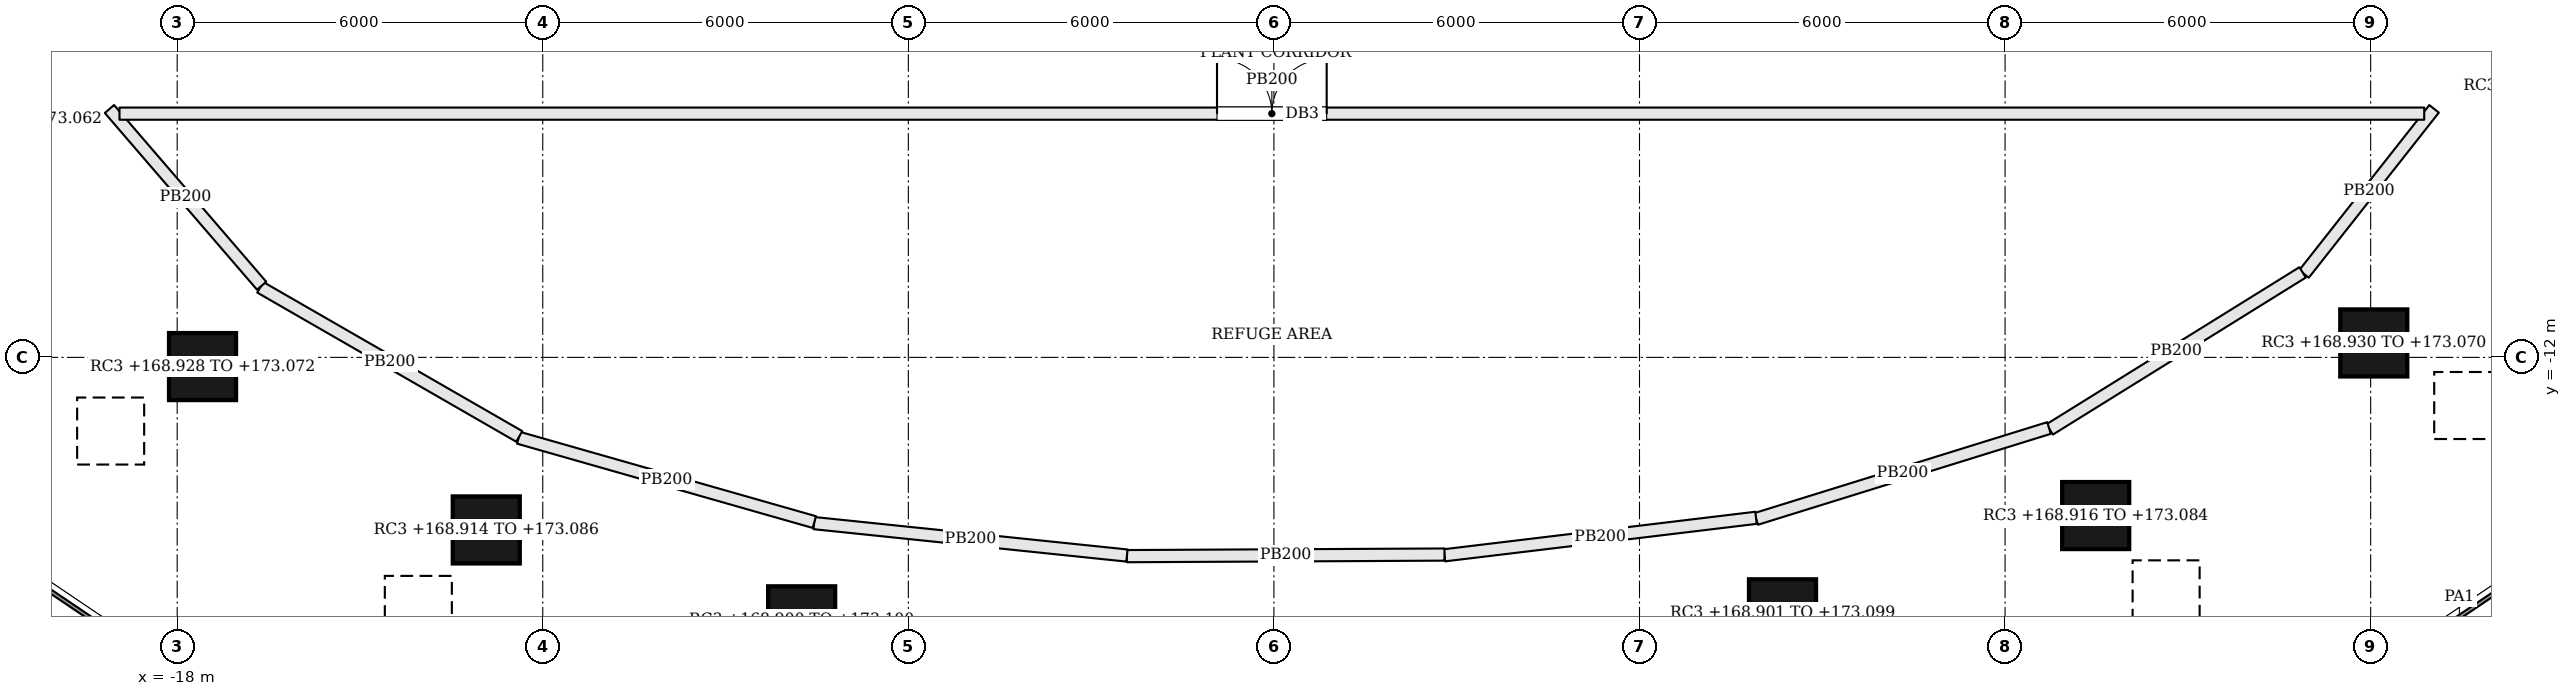
"""IFC4 building model, lengths in metres.
Left out: names, types, materials, properties, quantities, classifications, styles, units other than length and angle.
Written with IfcOpenShell. Run it as: python <this file> out.ifc"""

import sys

from ifc_helpers import new_model, si_unit, direction, frame, frame_2d, origin, origin_2d, place, context, subcontext, project, spatial, rectangle, extrude, element, fill, save


model = new_model("IFC4")
c1 = context("Model", 3, precision=1e-05, world=origin(), true_north=direction((0.0, 1.0)))
c2 = subcontext(c1, "Body", "Model", "MODEL_VIEW")
j1 = project(units=[si_unit("LENGTHUNIT", "METRE"), si_unit("PLANEANGLEUNIT", "RADIAN")], contexts=[c1])
p1 = place(None, origin())
s1 = spatial("IfcSite", under=j1, at=p1, CompositionType="ELEMENT")
p2 = place(p1, origin())
s2 = spatial("IfcBuilding", under=s1, at=p2, CompositionType="ELEMENT")
p3 = place(p2, frame((0.0, 0.0, 169.5)))
s3 = spatial("IfcBuildingStorey", under=s2, at=p3, CompositionType="ELEMENT", Elevation=169.5)
p4 = place(p3, frame((-17.584, -12.151, -0.572), z_axis=(-0.332531725465, -0.233315929766, 0.91377586337), x_axis=(0.574360318683, -0.818602604639, 0.0)))
e1 = element("IfcColumn", 1, at=p4, inside=s3, PredefinedType="COLUMN", context=c2, shape_type="SweptSolid", body=[
    extrude(rectangle(XDim=1.1, YDim=1.1, at=origin_2d()), origin(), (0.0, 0.0, 1.0), 4.535),
])
p5 = place(p3, frame((-12.927, -14.832, -0.586), z_axis=(-0.247177957591, -0.289068857345, 0.924847151152), x_axis=(0.760029513811, -0.649888558243, 0.0)))
e2 = element("IfcColumn", 2, at=p5, inside=s3, PredefinedType="COLUMN", context=c2, shape_type="SweptSolid", body=[
    extrude(rectangle(XDim=1.1, YDim=1.1, at=origin_2d()), origin(), (0.0, 0.0, 1.0), 4.511),
])
p6 = place(p3, frame((-7.751, -16.307, -0.6), z_axis=(-0.149431469431, -0.321095558359, 0.935183339429), x_axis=(0.906629641713, -0.421927354845, 0.0)))
e3 = element("IfcColumn", 3, at=p6, inside=s3, PredefinedType="COLUMN", context=c2, shape_type="SweptSolid", body=[
    extrude(rectangle(XDim=1.1, YDim=1.1, at=origin_2d()), origin(), (0.0, 0.0, 1.0), 4.491),
])
p7 = place(p3, frame((2.999, -16.836, -0.609), z_axis=(0.056869923091, -0.333375411222, 0.941077386319), x_axis=(0.985759878424, 0.168159038084, 0.0)))
e4 = element("IfcColumn", 4, at=p7, inside=s3, PredefinedType="COLUMN", context=c2, shape_type="SweptSolid", body=[
    extrude(rectangle(XDim=1.1, YDim=1.1, at=origin_2d()), origin(), (0.0, 0.0, 1.0), 4.482),
])
p8 = place(p3, frame((8.347, -16.192, -0.599), z_axis=(0.159354687822, -0.318926702187, 0.934286809337), x_axis=(0.89454907246, 0.446969749493, 0.0)))
e5 = element("IfcColumn", 5, at=p8, inside=s3, PredefinedType="COLUMN", context=c2, shape_type="SweptSolid", body=[
    extrude(rectangle(XDim=1.1, YDim=1.1, at=origin_2d()), origin(), (0.0, 0.0, 1.0), 4.493),
])
p9 = place(p3, frame((13.487, -14.596, -0.584), z_axis=(0.256195674107, -0.284818168637, 0.923711203452), x_axis=(0.743476713513, 0.66876182342, 0.0)))
e6 = element("IfcColumn", 6, at=p9, inside=s3, PredefinedType="COLUMN", context=c2, shape_type="SweptSolid", body=[
    extrude(rectangle(XDim=1.1, YDim=1.1, at=origin_2d()), origin(), (0.0, 0.0, 1.0), 4.512),
])
p10 = place(p3, frame((18.051, -11.763, -0.57), z_axis=(0.339960985599, -0.226443297406, 0.912770486667), x_axis=(0.554365652735, 0.832273226211, 0.0)))
e7 = element("IfcColumn", 7, at=p10, inside=s3, PredefinedType="COLUMN", context=c2, shape_type="SweptSolid", body=[
    extrude(rectangle(XDim=1.1, YDim=1.1, at=origin_2d()), origin(), (0.0, 0.0, 1.0), 4.536),
])
p11 = place(p3, frame((-21.13, -15.258, 0.0), z_axis=(0.0, 0.0, 1.0), x_axis=(0.829077786947, -0.559133278557, 0.0)))
e8 = element("IfcWall", 8, at=p11, inside=s3, PredefinedType="SOLIDWALL", context=c2, shape_type="SweptSolid", body=[
    extrude(rectangle(XDim=4.187, YDim=0.45, at=frame_2d((2.093, 0.0))), origin(), (0.0, 0.0, 1.0), 4.3),
])
p12 = place(p11, frame((1.043, 0.0, 1.2)))
e9 = element("IfcOpeningElement", 9, at=p12, cuts=e8, PredefinedType="OPENING", context=c2, shape_type="SweptSolid", body=[
    extrude(rectangle(XDim=2.1, YDim=1.8, at=frame_2d((1.05, 0.9))), frame((0.0, 0.235, 0.0), z_axis=(0.0, -1.0, 0.0), x_axis=(1.0, 0.0, 0.0)), (0.0, 0.0, 1.0), 0.47),
])
p13 = place(p3, frame((17.659, -17.598, 0.0), z_axis=(0.0, 0.0, 1.0), x_axis=(0.829077786947, 0.559133278557, 0.0)))
e10 = element("IfcWall", 10, at=p13, inside=s3, PredefinedType="SOLIDWALL", context=c2, shape_type="SweptSolid", body=[
    extrude(rectangle(XDim=4.187, YDim=0.45, at=frame_2d((2.093, 0.0))), origin(), (0.0, 0.0, 1.0), 4.3),
])
p14 = place(p13, frame((1.043, 0.0, 1.2)))
e11 = element("IfcOpeningElement", 11, at=p14, cuts=e10, PredefinedType="OPENING", context=c2, shape_type="SweptSolid", body=[
    extrude(rectangle(XDim=2.1, YDim=1.8, at=frame_2d((1.05, 0.9))), frame((0.0, 0.235, 0.0), z_axis=(0.0, -1.0, 0.0), x_axis=(1.0, 0.0, 0.0)), (0.0, 0.0, 1.0), 0.47),
])
p15 = place(p3, frame((-20.264, -15.932, 4.5), z_axis=(0.0, 0.0, 1.0), x_axis=(0.82905652271, -0.559164807683, 0.0)))
e12 = element("IfcWall", 12, at=p15, inside=s3, PredefinedType="PARAPET", context=c2, shape_type="SweptSolid", body=[
    extrude(rectangle(XDim=3.036, YDim=0.3, at=frame_2d((1.518, 0.0))), origin(), (0.0, 0.0, 1.0), 1.1),
])
p16 = place(p3, frame((17.791, -17.6, 4.5), z_axis=(0.0, 0.0, 1.0), x_axis=(0.829064921322, 0.559152355118, 0.0)))
e13 = element("IfcWall", 13, at=p16, inside=s3, PredefinedType="PARAPET", context=c2, shape_type="SweptSolid", body=[
    extrude(rectangle(XDim=4.017, YDim=0.3, at=frame_2d((2.008, 0.0))), origin(), (0.0, 0.0, 1.0), 1.1),
])
p17 = place(p3, frame((19.041, -7.921, 0.0), z_axis=(0.0, 0.0, 1.0), x_axis=(-0.618817980567, -0.785534408493, 0.0)))
e14 = element("IfcWall", 14, at=p17, inside=s3, PredefinedType="PARTITIONING", context=c2, shape_type="SweptSolid", body=[
    extrude(rectangle(XDim=3.45, YDim=0.2, at=frame_2d((1.725, 0.0))), origin(), (0.0, 0.0, 1.0), 4.3),
])
p18 = place(p3, frame((16.883, -10.605, 0.0), z_axis=(0.0, 0.0, 1.0), x_axis=(-0.849608511022, -0.527413858368, 0.0)))
e15 = element("IfcWall", 15, at=p18, inside=s3, PredefinedType="PARTITIONING", context=c2, shape_type="SweptSolid", body=[
    extrude(rectangle(XDim=4.886, YDim=0.2, at=frame_2d((2.443, 0.0))), origin(), (0.0, 0.0, 1.0), 4.3),
])
p19 = place(p3, frame((12.721, -13.159, 0.0), z_axis=(0.0, 0.0, 1.0), x_axis=(-0.955038559717, -0.296481617396, 0.0)))
e16 = element("IfcWall", 16, at=p19, inside=s3, PredefinedType="PARTITIONING", context=c2, shape_type="SweptSolid", body=[
    extrude(rectangle(XDim=5.032, YDim=0.2, at=frame_2d((2.516, 0.0))), origin(), (0.0, 0.0, 1.0), 4.3),
])
p20 = place(p3, frame((7.912, -14.633, 0.0), z_axis=(0.0, 0.0, 1.0), x_axis=(-0.992841344803, -0.119440629808, 0.0)))
e17 = element("IfcWall", 17, at=p20, inside=s3, PredefinedType="PARTITIONING", context=c2, shape_type="SweptSolid", body=[
    extrude(rectangle(XDim=5.149, YDim=0.2, at=frame_2d((2.574, 0.0))), origin(), (0.0, 0.0, 1.0), 4.3),
])
p21 = place(p3, frame((2.799, -15.236, 0.0), z_axis=(0.0, 0.0, 1.0), x_axis=(-0.9999876741, -0.004965042553, 0.0)))
e18 = element("IfcWall", 18, at=p21, inside=s3, PredefinedType="PARTITIONING", context=c2, shape_type="SweptSolid", body=[
    extrude(rectangle(XDim=5.212, YDim=0.2, at=frame_2d((2.606, 0.0))), origin(), (0.0, 0.0, 1.0), 4.3),
])
p22 = place(p3, frame((-2.412, -15.252, 0.0), z_axis=(0.0, 0.0, 1.0), x_axis=(-0.994673915242, 0.103071830955, 0.0)))
e19 = element("IfcWall", 19, at=p22, inside=s3, PredefinedType="PARTITIONING", context=c2, shape_type="SweptSolid", body=[
    extrude(rectangle(XDim=5.161, YDim=0.2, at=frame_2d((2.581, 0.0))), origin(), (0.0, 0.0, 1.0), 4.3),
])
p23 = place(p3, frame((-7.543, -14.703, 0.0), z_axis=(0.0, 0.0, 1.0), x_axis=(-0.961706339668, 0.27408195169, 0.0)))
e20 = element("IfcWall", 20, at=p23, inside=s3, PredefinedType="PARTITIONING", context=c2, shape_type="SweptSolid", body=[
    extrude(rectangle(XDim=5.045, YDim=0.2, at=frame_2d((2.522, 0.0))), origin(), (0.0, 0.0, 1.0), 4.3),
])
p24 = place(p3, frame((-12.386, -13.297, 0.0), z_axis=(0.0, 0.0, 1.0), x_axis=(-0.866617890559, 0.498972375751, 0.0)))
e21 = element("IfcWall", 21, at=p24, inside=s3, PredefinedType="PARTITIONING", context=c2, shape_type="SweptSolid", body=[
    extrude(rectangle(XDim=4.904, YDim=0.2, at=frame_2d((2.452, 0.0))), origin(), (0.0, 0.0, 1.0), 4.3),
])
p25 = place(p3, frame((-16.614, -10.824, 0.0), z_axis=(0.0, 0.0, 1.0), x_axis=(-0.652659458067, 0.757651391998, 0.0)))
e22 = element("IfcWall", 22, at=p25, inside=s3, PredefinedType="PARTITIONING", context=c2, shape_type="SweptSolid", body=[
    extrude(rectangle(XDim=3.827, YDim=0.2, at=frame_2d((1.914, 0.0))), origin(), (0.0, 0.0, 1.0), 4.3),
])
p26 = place(p3, frame((-18.947, -8.0, 0.0), z_axis=(0.0, 0.0, 1.0), x_axis=(1.0, 0.0, 0.0)))
e23 = element("IfcWall", 23, at=p26, inside=s3, PredefinedType="PARTITIONING", context=c2, shape_type="SweptSolid", body=[
    extrude(rectangle(XDim=37.826, YDim=0.2, at=frame_2d((18.913, 0.0))), origin(), (0.0, 0.0, 1.0), 4.3),
])
p27 = place(p26, frame((18.013, 0.0, 0.0)))
e24 = element("IfcOpeningElement", 24, at=p27, cuts=e23, PredefinedType="OPENING", context=c2, shape_type="SweptSolid", body=[
    extrude(rectangle(XDim=1.8, YDim=2.1, at=frame_2d((0.9, 1.05))), frame((0.0, 0.11, 0.0), z_axis=(0.0, -1.0, 0.0), x_axis=(1.0, 0.0, 0.0)), (0.0, 0.0, 1.0), 0.22),
])
p28 = place(p12, origin())
e25 = element("IfcWindow", 25, at=p28, inside=s3, PartitioningType="SINGLE_PANEL", PredefinedType="WINDOW", context=c2, shape_type="SweptSolid", body=[
    extrude(rectangle(XDim=2.1, YDim=1.8, at=frame_2d((1.05, 0.9))), frame((0.0, 0.135, 0.0), z_axis=(0.0, -1.0, 0.0), x_axis=(1.0, 0.0, 0.0)), (0.0, 0.0, 1.0), 0.06),
])
fill(e9, e25)
p29 = place(p14, origin())
e26 = element("IfcWindow", 26, at=p29, inside=s3, PartitioningType="SINGLE_PANEL", PredefinedType="WINDOW", context=c2, shape_type="SweptSolid", body=[
    extrude(rectangle(XDim=2.1, YDim=1.8, at=frame_2d((1.05, 0.9))), frame((0.0, 0.135, 0.0), z_axis=(0.0, -1.0, 0.0), x_axis=(1.0, 0.0, 0.0)), (0.0, 0.0, 1.0), 0.06),
])
fill(e11, e26)
p30 = place(p27, origin())
e27 = element("IfcDoor", 27, at=p30, inside=s3, OperationType="DOUBLE_DOOR_SINGLE_SWING", PredefinedType="DOOR", context=c2, shape_type="SweptSolid", body=[
    extrude(rectangle(XDim=1.8, YDim=2.1, at=frame_2d((0.9, 1.05))), frame((0.0, 0.025, 0.0), z_axis=(0.0, -1.0, 0.0), x_axis=(1.0, 0.0, 0.0)), (0.0, 0.0, 1.0), 0.05),
])
fill(e24, e27)
save(model, sys.argv[1])
